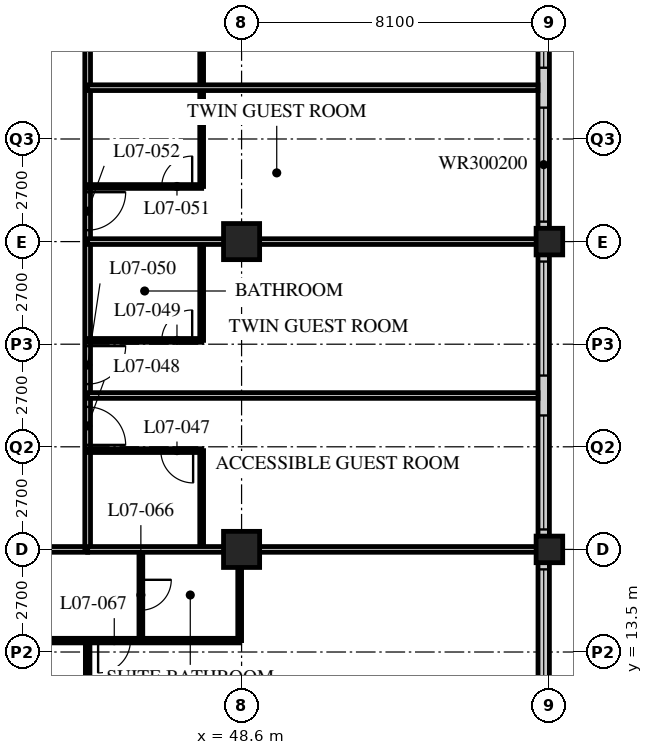
"""IFC4 building model, lengths in metres.
Left out: names, types, materials, properties, quantities, classifications, styles, units other than length and angle.
Written with IfcOpenShell. Run it as: python <this file> out.ifc"""

import sys

from ifc_helpers import new_model, si_unit, direction, frame, frame_2d, origin, origin_2d, place, context, subcontext, project, spatial, rectangle, hollow_rectangle, extrude, element, fill, save


model = new_model("IFC4")
c1 = context("Model", 3, precision=1e-05, world=origin(), true_north=direction((0.0, 1.0)))
c2 = subcontext(c1, "Body", "Model", "MODEL_VIEW")
j1 = project(units=[si_unit("LENGTHUNIT", "METRE"), si_unit("PLANEANGLEUNIT", "RADIAN")], contexts=[c1])
p1 = place(None, origin())
s1 = spatial("IfcSite", under=j1, at=p1, CompositionType="ELEMENT")
p2 = place(p1, origin())
s2 = spatial("IfcBuilding", under=s1, at=p2, CompositionType="ELEMENT")
p3 = place(p2, frame((0.0, 0.0, 36.4)))
s3 = spatial("IfcBuildingStorey", under=s2, at=p3, CompositionType="ELEMENT", Elevation=36.4)
for number, where, z_axis, x_axis in (
    (1, (48.6, 16.2, 0.0), (0.0, 0.0, 1.0), (1.0, 0.0, 0.0)),
    (2, (48.6, 24.3, 0.0), (0.0, 0.0, 1.0), (1.0, 0.0, 0.0)),
):
    element("IfcColumn", number, at=place(p3, frame(where, z_axis=z_axis, x_axis=x_axis)), inside=s3, PredefinedType="COLUMN", context=c2, shape_type="SweptSolid", body=[
        extrude(hollow_rectangle(XDim=0.95, YDim=0.95, WallThickness=0.095, at=origin_2d()), origin(), (0.0, 0.0, 1.0), 3.4),
    ])
for number, where, z_axis, x_axis in (
    (3, (56.7, 16.2, 0.0), (0.0, 0.0, 1.0), (1.0, 0.0, 0.0)),
    (4, (56.7, 24.3, 0.0), (0.0, 0.0, 1.0), (1.0, 0.0, 0.0)),
):
    element("IfcColumn", number, at=place(p3, frame(where, z_axis=z_axis, x_axis=x_axis)), inside=s3, PredefinedType="COLUMN", context=c2, shape_type="SweptSolid", body=[
        extrude(hollow_rectangle(XDim=0.7, YDim=0.7, WallThickness=0.06, at=origin_2d()), origin(), (0.0, 0.0, 1.0), 3.4),
    ])
p4 = place(p3, frame((56.55, 8.4, 0.0), z_axis=(0.0, 0.0, 1.0), x_axis=(0.0, 1.0, 0.0)))
e5 = element("IfcWall", 5, at=p4, inside=s3, PredefinedType="SOLIDWALL", context=c2, shape_type="SweptSolid", body=[
    extrude(rectangle(XDim=32.1, YDim=0.3, at=frame_2d((16.05, 0.0))), origin(), (0.0, 0.0, 1.0), 3.19),
])
p5 = place(p4, frame((0.225, 0.0, 0.9)))
e6 = element("IfcOpeningElement", 6, at=p5, cuts=e5, PredefinedType="OPENING", context=c2, shape_type="SweptSolid", body=[
    extrude(rectangle(XDim=3.0, YDim=2.0, at=frame_2d((1.5, 1.0))), frame((0.0, 0.16, 0.0), z_axis=(0.0, -1.0, 0.0), x_axis=(1.0, 0.0, 0.0)), (0.0, 0.0, 1.0), 0.32),
])
p6 = place(p4, frame((4.275, 0.0, 0.9)))
e7 = element("IfcOpeningElement", 7, at=p6, cuts=e5, PredefinedType="OPENING", context=c2, shape_type="SweptSolid", body=[
    extrude(rectangle(XDim=3.0, YDim=2.0, at=frame_2d((1.5, 1.0))), frame((0.0, 0.16, 0.0), z_axis=(0.0, -1.0, 0.0), x_axis=(1.0, 0.0, 0.0)), (0.0, 0.0, 1.0), 0.32),
])
p7 = place(p4, frame((8.325, 0.0, 0.9)))
e8 = element("IfcOpeningElement", 8, at=p7, cuts=e5, PredefinedType="OPENING", context=c2, shape_type="SweptSolid", body=[
    extrude(rectangle(XDim=3.0, YDim=2.0, at=frame_2d((1.5, 1.0))), frame((0.0, 0.16, 0.0), z_axis=(0.0, -1.0, 0.0), x_axis=(1.0, 0.0, 0.0)), (0.0, 0.0, 1.0), 0.32),
])
p8 = place(p4, frame((12.375, 0.0, 0.9)))
e9 = element("IfcOpeningElement", 9, at=p8, cuts=e5, PredefinedType="OPENING", context=c2, shape_type="SweptSolid", body=[
    extrude(rectangle(XDim=3.0, YDim=2.0, at=frame_2d((1.5, 1.0))), frame((0.0, 0.16, 0.0), z_axis=(0.0, -1.0, 0.0), x_axis=(1.0, 0.0, 0.0)), (0.0, 0.0, 1.0), 0.32),
])
p9 = place(p4, frame((16.425, 0.0, 0.9)))
e10 = element("IfcOpeningElement", 10, at=p9, cuts=e5, PredefinedType="OPENING", context=c2, shape_type="SweptSolid", body=[
    extrude(rectangle(XDim=3.0, YDim=2.0, at=frame_2d((1.5, 1.0))), frame((0.0, 0.16, 0.0), z_axis=(0.0, -1.0, 0.0), x_axis=(1.0, 0.0, 0.0)), (0.0, 0.0, 1.0), 0.32),
])
p10 = place(p4, frame((20.475, 0.0, 0.9)))
e11 = element("IfcOpeningElement", 11, at=p10, cuts=e5, PredefinedType="OPENING", context=c2, shape_type="SweptSolid", body=[
    extrude(rectangle(XDim=3.0, YDim=2.0, at=frame_2d((1.5, 1.0))), frame((0.0, 0.16, 0.0), z_axis=(0.0, -1.0, 0.0), x_axis=(1.0, 0.0, 0.0)), (0.0, 0.0, 1.0), 0.32),
])
p11 = place(p4, frame((24.525, 0.0, 0.9)))
e12 = element("IfcOpeningElement", 12, at=p11, cuts=e5, PredefinedType="OPENING", context=c2, shape_type="SweptSolid", body=[
    extrude(rectangle(XDim=3.0, YDim=2.0, at=frame_2d((1.5, 1.0))), frame((0.0, 0.16, 0.0), z_axis=(0.0, -1.0, 0.0), x_axis=(1.0, 0.0, 0.0)), (0.0, 0.0, 1.0), 0.32),
])
p12 = place(p4, frame((28.575, 0.0, 0.9)))
e13 = element("IfcOpeningElement", 13, at=p12, cuts=e5, PredefinedType="OPENING", context=c2, shape_type="SweptSolid", body=[
    extrude(rectangle(XDim=3.0, YDim=2.0, at=frame_2d((1.5, 1.0))), frame((0.0, 0.16, 0.0), z_axis=(0.0, -1.0, 0.0), x_axis=(1.0, 0.0, 0.0)), (0.0, 0.0, 1.0), 0.32),
])
p13 = place(p3, frame((12.15, 16.2, 0.0), z_axis=(0.0, 0.0, 1.0), x_axis=(1.0, 0.0, 0.0)))
e14 = element("IfcWall", 14, at=p13, inside=s3, PredefinedType="PARTITIONING", context=c2, shape_type="SweptSolid", body=[
    extrude(rectangle(XDim=32.4, YDim=0.15, at=frame_2d((16.2, 0.0))), origin(), (0.0, 0.0, 1.0), 2.578),
])
p14 = place(p13, frame((6.5, 0.0, 0.0)))
e15 = element("IfcOpeningElement", 15, at=p14, cuts=e14, PredefinedType="OPENING", context=c2, shape_type="SweptSolid", body=[
    extrude(rectangle(XDim=1.0, YDim=2.1, at=frame_2d((0.5, 1.05))), frame((0.0, 0.085, 0.0), z_axis=(0.0, -1.0, 0.0), x_axis=(1.0, 0.0, 0.0)), (0.0, 0.0, 1.0), 0.17),
])
p15 = place(p13, frame((8.4, 0.0, 0.0)))
e16 = element("IfcOpeningElement", 16, at=p15, cuts=e14, PredefinedType="OPENING", context=c2, shape_type="SweptSolid", body=[
    extrude(rectangle(XDim=1.0, YDim=2.1, at=frame_2d((0.5, 1.05))), frame((0.0, 0.085, 0.0), z_axis=(0.0, -1.0, 0.0), x_axis=(1.0, 0.0, 0.0)), (0.0, 0.0, 1.0), 0.17),
])
p16 = place(p13, frame((14.6, 0.0, 0.0)))
e17 = element("IfcOpeningElement", 17, at=p16, cuts=e14, PredefinedType="OPENING", context=c2, shape_type="SweptSolid", body=[
    extrude(rectangle(XDim=1.0, YDim=2.1, at=frame_2d((0.5, 1.05))), frame((0.0, 0.085, 0.0), z_axis=(0.0, -1.0, 0.0), x_axis=(1.0, 0.0, 0.0)), (0.0, 0.0, 1.0), 0.17),
])
p17 = place(p13, frame((16.5, 0.0, 0.0)))
e18 = element("IfcOpeningElement", 18, at=p17, cuts=e14, PredefinedType="OPENING", context=c2, shape_type="SweptSolid", body=[
    extrude(rectangle(XDim=1.0, YDim=2.1, at=frame_2d((0.5, 1.05))), frame((0.0, 0.085, 0.0), z_axis=(0.0, -1.0, 0.0), x_axis=(1.0, 0.0, 0.0)), (0.0, 0.0, 1.0), 0.17),
])
p18 = place(p13, frame((23.0, 0.0, 0.0)))
e19 = element("IfcOpeningElement", 19, at=p18, cuts=e14, PredefinedType="OPENING", context=c2, shape_type="SweptSolid", body=[
    extrude(rectangle(XDim=1.0, YDim=2.1, at=frame_2d((0.5, 1.05))), frame((0.0, 0.085, 0.0), z_axis=(0.0, -1.0, 0.0), x_axis=(1.0, 0.0, 0.0)), (0.0, 0.0, 1.0), 0.17),
])
p19 = place(p13, frame((24.6, 0.0, 0.0)))
e20 = element("IfcOpeningElement", 20, at=p19, cuts=e14, PredefinedType="OPENING", context=c2, shape_type="SweptSolid", body=[
    extrude(rectangle(XDim=1.0, YDim=2.1, at=frame_2d((0.5, 1.05))), frame((0.0, 0.085, 0.0), z_axis=(0.0, -1.0, 0.0), x_axis=(1.0, 0.0, 0.0)), (0.0, 0.0, 1.0), 0.17),
])
p20 = place(p13, frame((1.525, 0.0, 0.0)))
e21 = element("IfcOpeningElement", 21, at=p20, cuts=e14, PredefinedType="OPENING", context=c2, shape_type="SweptSolid", body=[
    extrude(rectangle(XDim=1.0, YDim=2.1, at=frame_2d((0.5, 1.05))), frame((0.0, 0.085, 0.0), z_axis=(0.0, -1.0, 0.0), x_axis=(1.0, 0.0, 0.0)), (0.0, 0.0, 1.0), 0.17),
])
p21 = place(p13, frame((29.875, 0.0, 0.0)))
e22 = element("IfcOpeningElement", 22, at=p21, cuts=e14, PredefinedType="OPENING", context=c2, shape_type="SweptSolid", body=[
    extrude(rectangle(XDim=1.0, YDim=2.1, at=frame_2d((0.5, 1.05))), frame((0.0, 0.085, 0.0), z_axis=(0.0, -1.0, 0.0), x_axis=(1.0, 0.0, 0.0)), (0.0, 0.0, 1.0), 0.17),
])
p22 = place(p3, frame((44.55, 16.2, 0.0), z_axis=(0.0, 0.0, 1.0), x_axis=(0.0, 1.0, 0.0)))
e23 = element("IfcWall", 23, at=p22, inside=s3, PredefinedType="PARTITIONING", context=c2, shape_type="SweptSolid", body=[
    extrude(rectangle(XDim=26.1, YDim=0.15, at=frame_2d((13.05, 0.0))), origin(), (0.0, 0.0, 1.0), 3.19),
])
p23 = place(p22, frame((2.75, 0.0, 0.0)))
e24 = element("IfcOpeningElement", 24, at=p23, cuts=e23, PredefinedType="OPENING", context=c2, shape_type="SweptSolid", body=[
    extrude(rectangle(XDim=1.0, YDim=2.1, at=frame_2d((0.5, 1.05))), frame((0.0, 0.085, 0.0), z_axis=(0.0, -1.0, 0.0), x_axis=(1.0, 0.0, 0.0)), (0.0, 0.0, 1.0), 0.17),
])
p24 = place(p22, frame((4.35, 0.0, 0.0)))
e25 = element("IfcOpeningElement", 25, at=p24, cuts=e23, PredefinedType="OPENING", context=c2, shape_type="SweptSolid", body=[
    extrude(rectangle(XDim=1.0, YDim=2.1, at=frame_2d((0.5, 1.05))), frame((0.0, 0.085, 0.0), z_axis=(0.0, -1.0, 0.0), x_axis=(1.0, 0.0, 0.0)), (0.0, 0.0, 1.0), 0.17),
])
p25 = place(p22, frame((8.4, 0.0, 0.0)))
e26 = element("IfcOpeningElement", 26, at=p25, cuts=e23, PredefinedType="OPENING", context=c2, shape_type="SweptSolid", body=[
    extrude(rectangle(XDim=1.0, YDim=2.1, at=frame_2d((0.5, 1.05))), frame((0.0, 0.085, 0.0), z_axis=(0.0, -1.0, 0.0), x_axis=(1.0, 0.0, 0.0)), (0.0, 0.0, 1.0), 0.17),
])
p26 = place(p22, frame((14.6, 0.0, 0.0)))
e27 = element("IfcOpeningElement", 27, at=p26, cuts=e23, PredefinedType="OPENING", context=c2, shape_type="SweptSolid", body=[
    extrude(rectangle(XDim=1.0, YDim=2.1, at=frame_2d((0.5, 1.05))), frame((0.0, 0.085, 0.0), z_axis=(0.0, -1.0, 0.0), x_axis=(1.0, 0.0, 0.0)), (0.0, 0.0, 1.0), 0.17),
])
p27 = place(p22, frame((18.65, 0.0, 0.0)))
e28 = element("IfcOpeningElement", 28, at=p27, cuts=e23, PredefinedType="OPENING", context=c2, shape_type="SweptSolid", body=[
    extrude(rectangle(XDim=1.0, YDim=2.1, at=frame_2d((0.5, 1.05))), frame((0.0, 0.085, 0.0), z_axis=(0.0, -1.0, 0.0), x_axis=(1.0, 0.0, 0.0)), (0.0, 0.0, 1.0), 0.17),
])
p28 = place(p22, frame((22.65, 0.0, 0.0)))
e29 = element("IfcOpeningElement", 29, at=p28, cuts=e23, PredefinedType="OPENING", context=c2, shape_type="SweptSolid", body=[
    extrude(rectangle(XDim=1.0, YDim=2.1, at=frame_2d((0.5, 1.05))), frame((0.0, 0.085, 0.0), z_axis=(0.0, -1.0, 0.0), x_axis=(1.0, 0.0, 0.0)), (0.0, 0.0, 1.0), 0.17),
])
p29 = place(p3, frame((47.55, 16.2, 0.0), z_axis=(0.0, 0.0, 1.0), x_axis=(0.0, 1.0, 0.0)))
e30 = element("IfcWall", 30, at=p29, inside=s3, PredefinedType="PARTITIONING", context=c2, shape_type="SweptSolid", body=[
    extrude(rectangle(XDim=2.6, YDim=0.1, at=frame_2d((1.3, 0.0))), origin(), (0.0, 0.0, 1.0), 3.19),
])
p30 = place(p3, frame((44.55, 18.8, 0.0), z_axis=(0.0, 0.0, 1.0), x_axis=(1.0, 0.0, 0.0)))
e31 = element("IfcWall", 31, at=p30, inside=s3, PredefinedType="PARTITIONING", context=c2, shape_type="SweptSolid", body=[
    extrude(rectangle(XDim=3.0, YDim=0.1, at=frame_2d((1.5, 0.0))), origin(), (0.0, 0.0, 1.0), 3.19),
])
p31 = place(p30, frame((1.925, 0.0, 0.0)))
e32 = element("IfcOpeningElement", 32, at=p31, cuts=e31, PredefinedType="OPENING", context=c2, shape_type="SweptSolid", body=[
    extrude(rectangle(XDim=0.85, YDim=2.1, at=frame_2d((0.425, 1.05))), frame((0.0, 0.06, 0.0), z_axis=(0.0, -1.0, 0.0), x_axis=(1.0, 0.0, 0.0)), (0.0, 0.0, 1.0), 0.12),
])
p32 = place(p3, frame((44.55, 20.25, 0.0), z_axis=(0.0, 0.0, 1.0), x_axis=(1.0, 0.0, 0.0)))
e33 = element("IfcWall", 33, at=p32, inside=s3, PredefinedType="PARTITIONING", context=c2, shape_type="SweptSolid", body=[
    extrude(rectangle(XDim=11.85, YDim=0.15, at=frame_2d((5.925, 0.0))), origin(), (0.0, 0.0, 1.0), 3.19),
])
p33 = place(p3, frame((47.55, 21.7, 0.0), z_axis=(0.0, 0.0, 1.0), x_axis=(0.0, 1.0, 0.0)))
e34 = element("IfcWall", 34, at=p33, inside=s3, PredefinedType="PARTITIONING", context=c2, shape_type="SweptSolid", body=[
    extrude(rectangle(XDim=2.6, YDim=0.1, at=frame_2d((1.3, 0.0))), origin(), (0.0, 0.0, 1.0), 3.19),
])
p34 = place(p3, frame((44.55, 21.7, 0.0), z_axis=(0.0, 0.0, 1.0), x_axis=(1.0, 0.0, 0.0)))
e35 = element("IfcWall", 35, at=p34, inside=s3, PredefinedType="PARTITIONING", context=c2, shape_type="SweptSolid", body=[
    extrude(rectangle(XDim=3.0, YDim=0.1, at=frame_2d((1.5, 0.0))), origin(), (0.0, 0.0, 1.0), 3.19),
])
p35 = place(p34, frame((1.95, 0.0, 0.0)))
e36 = element("IfcOpeningElement", 36, at=p35, cuts=e35, PredefinedType="OPENING", context=c2, shape_type="SweptSolid", body=[
    extrude(rectangle(XDim=0.8, YDim=2.1, at=frame_2d((0.4, 1.05))), frame((0.0, 0.06, 0.0), z_axis=(0.0, -1.0, 0.0), x_axis=(1.0, 0.0, 0.0)), (0.0, 0.0, 1.0), 0.12),
])
p36 = place(p3, frame((44.55, 24.3, 0.0), z_axis=(0.0, 0.0, 1.0), x_axis=(1.0, 0.0, 0.0)))
e37 = element("IfcWall", 37, at=p36, inside=s3, PredefinedType="PARTITIONING", context=c2, shape_type="SweptSolid", body=[
    extrude(rectangle(XDim=11.85, YDim=0.15, at=frame_2d((5.925, 0.0))), origin(), (0.0, 0.0, 1.0), 2.578),
])
p37 = place(p3, frame((47.55, 25.75, 0.0), z_axis=(0.0, 0.0, 1.0), x_axis=(0.0, 1.0, 0.0)))
e38 = element("IfcWall", 38, at=p37, inside=s3, PredefinedType="PARTITIONING", context=c2, shape_type="SweptSolid", body=[
    extrude(rectangle(XDim=4.9, YDim=0.1, at=frame_2d((2.45, 0.0))), origin(), (0.0, 0.0, 1.0), 3.19),
])
p38 = place(p3, frame((44.55, 25.75, 0.0), z_axis=(0.0, 0.0, 1.0), x_axis=(1.0, 0.0, 0.0)))
e39 = element("IfcWall", 39, at=p38, inside=s3, PredefinedType="PARTITIONING", context=c2, shape_type="SweptSolid", body=[
    extrude(rectangle(XDim=3.0, YDim=0.1, at=frame_2d((1.5, 0.0))), origin(), (0.0, 0.0, 1.0), 3.19),
])
p39 = place(p38, frame((1.95, 0.0, 0.0)))
e40 = element("IfcOpeningElement", 40, at=p39, cuts=e39, PredefinedType="OPENING", context=c2, shape_type="SweptSolid", body=[
    extrude(rectangle(XDim=0.8, YDim=2.1, at=frame_2d((0.4, 1.05))), frame((0.0, 0.06, 0.0), z_axis=(0.0, -1.0, 0.0), x_axis=(1.0, 0.0, 0.0)), (0.0, 0.0, 1.0), 0.12),
])
p40 = place(p3, frame((44.55, 28.35, 0.0), z_axis=(0.0, 0.0, 1.0), x_axis=(1.0, 0.0, 0.0)))
e41 = element("IfcWall", 41, at=p40, inside=s3, PredefinedType="PARTITIONING", context=c2, shape_type="SweptSolid", body=[
    extrude(rectangle(XDim=11.85, YDim=0.15, at=frame_2d((5.925, 0.0))), origin(), (0.0, 0.0, 1.0), 3.19),
])
p41 = place(p3, frame((40.5, 13.8, 0.0), z_axis=(0.0, 0.0, 1.0), x_axis=(1.0, 0.0, 0.0)))
e42 = element("IfcWall", 42, at=p41, inside=s3, PredefinedType="PARTITIONING", context=c2, shape_type="SweptSolid", body=[
    extrude(rectangle(XDim=8.05, YDim=0.12, at=frame_2d((4.025, 0.0))), origin(), (0.0, 0.0, 1.0), 3.19),
])
p42 = place(p41, frame((0.475, 0.0, 0.0)))
e43 = element("IfcOpeningElement", 43, at=p42, cuts=e42, PredefinedType="OPENING", context=c2, shape_type="SweptSolid", body=[
    extrude(rectangle(XDim=0.85, YDim=2.1, at=frame_2d((0.425, 1.05))), frame((0.0, 0.07, 0.0), z_axis=(0.0, -1.0, 0.0), x_axis=(1.0, 0.0, 0.0)), (0.0, 0.0, 1.0), 0.14),
])
p43 = place(p41, frame((4.325, 0.0, 0.0)))
e44 = element("IfcOpeningElement", 44, at=p43, cuts=e42, PredefinedType="OPENING", context=c2, shape_type="SweptSolid", body=[
    extrude(rectangle(XDim=0.85, YDim=2.1, at=frame_2d((0.425, 1.05))), frame((0.0, 0.07, 0.0), z_axis=(0.0, -1.0, 0.0), x_axis=(1.0, 0.0, 0.0)), (0.0, 0.0, 1.0), 0.14),
])
p44 = place(p3, frame((45.95, 16.2, 0.0), z_axis=(0.0, 0.0, 1.0), x_axis=(0.0, -1.0, 0.0)))
e45 = element("IfcWall", 45, at=p44, inside=s3, PredefinedType="PARTITIONING", context=c2, shape_type="SweptSolid", body=[
    extrude(rectangle(XDim=2.4, YDim=0.1, at=frame_2d((1.2, 0.0))), origin(), (0.0, 0.0, 1.0), 3.19),
])
p45 = place(p44, frame((0.8, 0.0, 0.0)))
e46 = element("IfcOpeningElement", 46, at=p45, cuts=e45, PredefinedType="OPENING", context=c2, shape_type="SweptSolid", body=[
    extrude(rectangle(XDim=0.8, YDim=2.1, at=frame_2d((0.4, 1.05))), frame((0.0, 0.06, 0.0), z_axis=(0.0, -1.0, 0.0), x_axis=(1.0, 0.0, 0.0)), (0.0, 0.0, 1.0), 0.12),
])
p46 = place(p3, frame((48.55, 16.2, 0.0), z_axis=(0.0, 0.0, 1.0), x_axis=(0.0, -1.0, 0.0)))
e47 = element("IfcWall", 47, at=p46, inside=s3, PredefinedType="PARTITIONING", context=c2, shape_type="SweptSolid", body=[
    extrude(rectangle(XDim=2.4, YDim=0.1, at=frame_2d((1.2, 0.0))), origin(), (0.0, 0.0, 1.0), 2.578),
])
p47 = place(p3, frame((44.55, 13.8, 0.0), z_axis=(0.0, 0.0, 1.0), x_axis=(0.0, -1.0, 0.0)))
e48 = element("IfcWall", 48, at=p47, inside=s3, PredefinedType="PARTITIONING", context=c2, shape_type="SweptSolid", body=[
    extrude(rectangle(XDim=13.5, YDim=0.12, at=frame_2d((6.75, 0.0))), origin(), (0.0, 0.0, 1.0), 3.19),
])
p48 = place(p3, frame((44.55, 16.2, 0.0), z_axis=(0.0, 0.0, 1.0), x_axis=(1.0, 0.0, 0.0)))
e49 = element("IfcWall", 49, at=p48, inside=s3, PredefinedType="PARTITIONING", context=c2, shape_type="SweptSolid", body=[
    extrude(rectangle(XDim=11.85, YDim=0.15, at=frame_2d((5.925, 0.0))), origin(), (0.0, 0.0, 1.0), 2.578),
])
p49 = place(p6, origin())
e50 = element("IfcWindow", 50, at=p49, inside=s3, PartitioningType="SINGLE_PANEL", PredefinedType="WINDOW", context=c2, shape_type="SweptSolid", body=[
    extrude(rectangle(XDim=3.0, YDim=2.0, at=frame_2d((1.5, 1.0))), frame((0.0, 0.03, 0.0), z_axis=(0.0, -1.0, 0.0), x_axis=(1.0, 0.0, 0.0)), (0.0, 0.0, 1.0), 0.06),
])
fill(e7, e50)
p50 = place(p7, origin())
e51 = element("IfcWindow", 51, at=p50, inside=s3, PartitioningType="SINGLE_PANEL", PredefinedType="WINDOW", context=c2, shape_type="SweptSolid", body=[
    extrude(rectangle(XDim=3.0, YDim=2.0, at=frame_2d((1.5, 1.0))), frame((0.0, 0.03, 0.0), z_axis=(0.0, -1.0, 0.0), x_axis=(1.0, 0.0, 0.0)), (0.0, 0.0, 1.0), 0.06),
])
fill(e8, e51)
p51 = place(p8, origin())
e52 = element("IfcWindow", 52, at=p51, inside=s3, PartitioningType="SINGLE_PANEL", PredefinedType="WINDOW", context=c2, shape_type="SweptSolid", body=[
    extrude(rectangle(XDim=3.0, YDim=2.0, at=frame_2d((1.5, 1.0))), frame((0.0, 0.03, 0.0), z_axis=(0.0, -1.0, 0.0), x_axis=(1.0, 0.0, 0.0)), (0.0, 0.0, 1.0), 0.06),
])
fill(e9, e52)
p52 = place(p9, origin())
e53 = element("IfcWindow", 53, at=p52, inside=s3, PartitioningType="SINGLE_PANEL", PredefinedType="WINDOW", context=c2, shape_type="SweptSolid", body=[
    extrude(rectangle(XDim=3.0, YDim=2.0, at=frame_2d((1.5, 1.0))), frame((0.0, 0.03, 0.0), z_axis=(0.0, -1.0, 0.0), x_axis=(1.0, 0.0, 0.0)), (0.0, 0.0, 1.0), 0.06),
])
fill(e10, e53)
p53 = place(p10, origin())
e54 = element("IfcWindow", 54, at=p53, inside=s3, PartitioningType="SINGLE_PANEL", PredefinedType="WINDOW", context=c2, shape_type="SweptSolid", body=[
    extrude(rectangle(XDim=3.0, YDim=2.0, at=frame_2d((1.5, 1.0))), frame((0.0, 0.03, 0.0), z_axis=(0.0, -1.0, 0.0), x_axis=(1.0, 0.0, 0.0)), (0.0, 0.0, 1.0), 0.06),
])
fill(e11, e54)
p54 = place(p31, origin())
e55 = element("IfcDoor", 55, at=p54, inside=s3, OperationType="SINGLE_SWING_LEFT", PredefinedType="DOOR", context=c2, shape_type="SweptSolid", body=[
    extrude(rectangle(XDim=0.85, YDim=2.1, at=frame_2d((0.425, 1.05))), frame((0.0, 0.025, 0.0), z_axis=(0.0, -1.0, 0.0), x_axis=(1.0, 0.0, 0.0)), (0.0, 0.0, 1.0), 0.05),
])
fill(e32, e55)
p55 = place(p23, origin())
e56 = element("IfcDoor", 56, at=p55, inside=s3, OperationType="SINGLE_SWING_RIGHT", PredefinedType="DOOR", context=c2, shape_type="SweptSolid", body=[
    extrude(rectangle(XDim=1.0, YDim=2.1, at=frame_2d((0.5, 1.05))), frame((0.0, 0.025, 0.0), z_axis=(0.0, -1.0, 0.0), x_axis=(1.0, 0.0, 0.0)), (0.0, 0.0, 1.0), 0.05),
])
fill(e24, e56)
p56 = place(p35, origin())
e57 = element("IfcDoor", 57, at=p56, inside=s3, OperationType="SINGLE_SWING_RIGHT", PredefinedType="DOOR", context=c2, shape_type="SweptSolid", body=[
    extrude(rectangle(XDim=0.8, YDim=2.1, at=frame_2d((0.4, 1.05))), frame((0.0, 0.025, 0.0), z_axis=(0.0, -1.0, 0.0), x_axis=(1.0, 0.0, 0.0)), (0.0, 0.0, 1.0), 0.05),
])
fill(e36, e57)
p57 = place(p24, origin())
e58 = element("IfcDoor", 58, at=p57, inside=s3, OperationType="SINGLE_SWING_LEFT", PredefinedType="DOOR", context=c2, shape_type="SweptSolid", body=[
    extrude(rectangle(XDim=1.0, YDim=2.1, at=frame_2d((0.5, 1.05))), frame((0.0, 0.025, 0.0), z_axis=(0.0, -1.0, 0.0), x_axis=(1.0, 0.0, 0.0)), (0.0, 0.0, 1.0), 0.05),
])
fill(e25, e58)
p58 = place(p39, origin())
e59 = element("IfcDoor", 59, at=p58, inside=s3, OperationType="SINGLE_SWING_RIGHT", PredefinedType="DOOR", context=c2, shape_type="SweptSolid", body=[
    extrude(rectangle(XDim=0.8, YDim=2.1, at=frame_2d((0.4, 1.05))), frame((0.0, 0.025, 0.0), z_axis=(0.0, -1.0, 0.0), x_axis=(1.0, 0.0, 0.0)), (0.0, 0.0, 1.0), 0.05),
])
fill(e40, e59)
p59 = place(p25, origin())
e60 = element("IfcDoor", 60, at=p59, inside=s3, OperationType="SINGLE_SWING_LEFT", PredefinedType="DOOR", context=c2, shape_type="SweptSolid", body=[
    extrude(rectangle(XDim=1.0, YDim=2.1, at=frame_2d((0.5, 1.05))), frame((0.0, 0.025, 0.0), z_axis=(0.0, -1.0, 0.0), x_axis=(1.0, 0.0, 0.0)), (0.0, 0.0, 1.0), 0.05),
])
fill(e26, e60)
p60 = place(p45, origin())
e61 = element("IfcDoor", 61, at=p60, inside=s3, OperationType="SINGLE_SWING_LEFT", PredefinedType="DOOR", context=c2, shape_type="SweptSolid", body=[
    extrude(rectangle(XDim=0.8, YDim=2.1, at=frame_2d((0.4, 1.05))), frame((0.0, 0.025, 0.0), z_axis=(0.0, -1.0, 0.0), x_axis=(1.0, 0.0, 0.0)), (0.0, 0.0, 1.0), 0.05),
])
fill(e46, e61)
p61 = place(p43, origin())
e62 = element("IfcDoor", 62, at=p61, inside=s3, OperationType="SINGLE_SWING_RIGHT", PredefinedType="DOOR", context=c2, shape_type="SweptSolid", body=[
    extrude(rectangle(XDim=0.85, YDim=2.1, at=frame_2d((0.425, 1.05))), frame((0.0, 0.025, 0.0), z_axis=(0.0, -1.0, 0.0), x_axis=(1.0, 0.0, 0.0)), (0.0, 0.0, 1.0), 0.05),
])
fill(e44, e62)
save(model, sys.argv[1])
